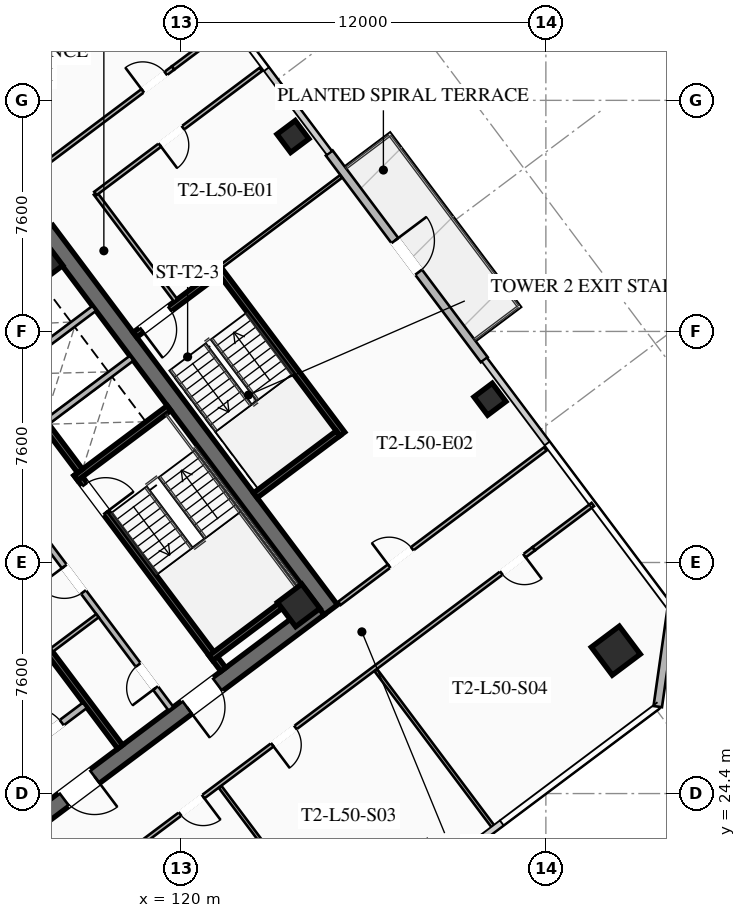
"""IFC4 building model, lengths in metres.
Left out: names, types, materials, properties, quantities, classifications, styles, units other than length and angle.
Written with IfcOpenShell. Run it as: python <this file> out.ifc"""

import sys

from ifc_helpers import new_model, si_unit, direction, frame, frame_2d, origin, origin_2d, place, context, subcontext, project, spatial, rectangle, hollow_rectangle, extrude, element, fill, save


model = new_model("IFC4")
c1 = context("Model", 3, precision=1e-05, world=origin(), true_north=direction((0.0, 1.0)))
c2 = subcontext(c1, "Body", "Model", "MODEL_VIEW")
j1 = project(units=[si_unit("LENGTHUNIT", "METRE"), si_unit("PLANEANGLEUNIT", "RADIAN")], contexts=[c1])
p1 = place(None, origin())
s1 = spatial("IfcSite", under=j1, at=p1, CompositionType="ELEMENT")
p2 = place(p1, origin())
s2 = spatial("IfcBuilding", under=s1, at=p2, CompositionType="ELEMENT")
p3 = place(p2, frame((0.0, 0.0, 185.4)))
s3 = spatial("IfcBuildingStorey", under=s2, at=p3, CompositionType="ELEMENT", Elevation=185.4)
p4 = place(p3, frame((115.564, 42.923, 0.0), z_axis=(0.0, 0.0, 1.0), x_axis=(0.600005007985, -0.799996243986, 0.0)))
e1 = element("IfcWall", 1, at=p4, inside=s3, PredefinedType="SHEAR", context=c2, shape_type="SweptSolid", body=[
    extrude(rectangle(XDim=15.6, YDim=0.55, at=frame_2d((7.8, 0.0))), origin(), (0.0, 0.0, 1.0), 3.55),
])
p5 = place(p3, frame((124.539, 30.498, 0.0), z_axis=(0.0, 0.0, 1.0), x_axis=(-0.799998054672, -0.600002593761, 0.0)))
e2 = element("IfcWall", 2, at=p5, inside=s3, PredefinedType="SHEAR", context=c2, shape_type="SweptSolid", body=[
    extrude(rectangle(XDim=15.06, YDim=0.55, at=frame_2d((7.53, 0.0))), origin(), (0.0, 0.0, 1.0), 3.55),
])
p6 = place(p5, frame((9.23, 0.0, 0.0)))
e3 = element("IfcOpeningElement", 3, at=p6, cuts=e2, PredefinedType="OPENING", context=c2, shape_type="SweptSolid", body=[
    extrude(rectangle(XDim=1.25, YDim=2.25, at=frame_2d((0.625, 1.125))), frame((0.0, 0.285, 0.0), z_axis=(0.0, -1.0, 0.0), x_axis=(1.0, 0.0, 0.0)), (0.0, 0.0, 1.0), 0.57),
])
p7 = place(p5, frame((4.18, 0.0, 0.0)))
e4 = element("IfcOpeningElement", 4, at=p7, cuts=e2, PredefinedType="OPENING", context=c2, shape_type="SweptSolid", body=[
    extrude(rectangle(XDim=1.25, YDim=2.25, at=frame_2d((0.625, 1.125))), frame((0.0, 0.285, 0.0), z_axis=(0.0, -1.0, 0.0), x_axis=(1.0, 0.0, 0.0)), (0.0, 0.0, 1.0), 0.57),
])
for number, where, z_axis, x_axis in (
    (5, (123.87, 30.59, 0.0), (0.0, 0.0, 1.0), (0.8, 0.6, 0.0)),
    (6, (115.41, 41.87, 0.0), (0.0, 0.0, 1.0), (0.8, 0.6, 0.0)),
):
    element("IfcColumn", number, at=place(p3, frame(where, z_axis=z_axis, x_axis=x_axis)), inside=s3, PredefinedType="COLUMN", context=c2, shape_type="SweptSolid", body=[
        extrude(hollow_rectangle(XDim=1.0, YDim=1.0, WallThickness=0.04, at=origin_2d()), origin(), (0.0, 0.0, 1.0), 3.37),
    ])
p8 = place(p3, frame((134.3, 29.1, 0.0), z_axis=(0.0, 0.0, 1.0), x_axis=(0.799999996291, 0.600000004945, 0.0)))
e7 = element("IfcColumn", 7, at=p8, inside=s3, PredefinedType="COLUMN", context=c2, shape_type="SweptSolid", body=[
    extrude(hollow_rectangle(XDim=1.15, YDim=1.15, WallThickness=0.045, at=origin_2d()), origin(), (0.0, 0.0, 1.0), 3.37),
])
for number, where, z_axis, x_axis in (
    (8, (130.16, 37.37, 0.0), (0.0, 0.0, 1.0), (0.8, 0.6, 0.0)),
    (9, (123.68, 46.01, 0.0), (0.0, 0.0, 1.0), (0.8, 0.6, 0.0)),
):
    element("IfcColumn", number, at=place(p3, frame(where, z_axis=z_axis, x_axis=x_axis)), inside=s3, PredefinedType="COLUMN", context=c2, shape_type="SweptSolid", body=[
        extrude(hollow_rectangle(XDim=0.75, YDim=0.75, WallThickness=0.032, at=origin_2d()), origin(), (0.0, 0.0, 1.0), 3.37),
    ])
p9 = place(p3, frame((124.874, 45.468, 0.0), z_axis=(0.0, 0.0, 1.0), x_axis=(0.600004595526, -0.799996553335, 0.0)))
e10 = element("IfcWall", 10, at=p9, inside=s3, PredefinedType="SOLIDWALL", context=c2, shape_type="SweptSolid", body=[
    extrude(rectangle(XDim=8.5, YDim=0.28, at=frame_2d((4.25, 0.0))), origin(), (0.0, 0.0, 1.0), 3.37),
])
p10 = place(p9, frame((3.6, 0.0, 0.0)))
e11 = element("IfcOpeningElement", 11, at=p10, cuts=e10, PredefinedType="OPENING", context=c2, shape_type="SweptSolid", body=[
    extrude(rectangle(XDim=1.3, YDim=2.15, at=frame_2d((0.65, 1.075))), frame((0.0, 0.15, 0.0), z_axis=(0.0, -1.0, 0.0), x_axis=(1.0, 0.0, 0.0)), (0.0, 0.0, 1.0), 0.3),
])
p11 = place(p3, frame((136.14, 30.48, 0.0), z_axis=(0.0, 0.0, 1.0), x_axis=(-0.141410847992, -0.989950994782, 0.0)))
e12 = element("IfcWall", 12, at=p11, inside=s3, PredefinedType="SOLIDWALL", context=c2, shape_type="SweptSolid", body=[
    extrude(rectangle(XDim=3.253, YDim=0.28, at=frame_2d((1.626, 0.0))), origin(), (0.0, 0.0, 1.0), 3.37),
])
p12 = place(p3, frame((116.56, 34.92, 0.0), z_axis=(0.0, 0.0, 1.0), x_axis=(0.59999029481, -0.8000072788, 0.0)))
e13 = element("IfcWall", 13, at=p12, inside=s3, PredefinedType="SHEAR", context=c2, shape_type="SweptSolid", body=[
    extrude(rectangle(XDim=8.05, YDim=0.2, at=frame_2d((4.025, 0.0))), origin(), (0.0, 0.0, 1.0), 3.37),
])
p13 = place(p12, frame((0.45, 0.0, 0.0)))
e14 = element("IfcOpeningElement", 14, at=p13, cuts=e13, PredefinedType="OPENING", context=c2, shape_type="SweptSolid", body=[
    extrude(rectangle(XDim=1.15, YDim=2.2, at=frame_2d((0.575, 1.1))), frame((0.0, 0.11, 0.0), z_axis=(0.0, -1.0, 0.0), x_axis=(1.0, 0.0, 0.0)), (0.0, 0.0, 1.0), 0.22),
])
for number, where, z_axis, x_axis in (
    (15, (116.54, 34.78, 0.0), (0.0, 0.0, 1.0), (0.8, 0.6, 0.0)),
    (16, (120.98, 28.86, 0.0), (0.0, 0.0, 1.0), (0.8, 0.6, 0.0)),
):
    element("IfcWall", number, at=place(p3, frame(where, z_axis=z_axis, x_axis=x_axis)), inside=s3, PredefinedType="SHEAR", context=c2, shape_type="SweptSolid", body=[
        extrude(rectangle(XDim=3.83, YDim=0.2, at=frame_2d((1.915, 0.0))), origin(), (0.0, 0.0, 1.0), 3.37),
    ])
p14 = place(p3, frame((117.998, 25.936, 0.0), z_axis=(0.0, 0.0, 1.0), x_axis=(-0.600002693989, 0.799997979501, 0.0)))
e17 = element("IfcWall", 17, at=p14, inside=s3, PredefinedType="SHEAR", context=c2, shape_type="SweptSolid", body=[
    extrude(rectangle(XDim=14.5, YDim=0.2, at=frame_2d((7.25, 0.0))), origin(), (0.0, 0.0, 1.0), 3.37),
])
p15 = place(p3, frame((114.316, 25.412, 0.0), z_axis=(0.0, 0.0, 1.0), x_axis=(0.800018601094, 0.59997519774, 0.0)))
e18 = element("IfcWall", 18, at=p15, inside=s3, PredefinedType="SOLIDWALL", context=c2, shape_type="SweptSolid", body=[
    extrude(rectangle(XDim=3.15, YDim=0.22, at=frame_2d((1.575, 0.0))), origin(), (0.0, 0.0, 1.0), 2.723),
])
p16 = place(p15, frame((0.95, 0.0, 0.0)))
e19 = element("IfcOpeningElement", 19, at=p16, cuts=e18, PredefinedType="OPENING", context=c2, shape_type="SweptSolid", body=[
    extrude(rectangle(XDim=1.25, YDim=2.25, at=frame_2d((0.625, 1.125))), frame((0.0, 0.12, 0.0), z_axis=(0.0, -1.0, 0.0), x_axis=(1.0, 0.0, 0.0)), (0.0, 0.0, 1.0), 0.24),
])
p17 = place(p3, frame((112.81, 40.17, 0.0), z_axis=(0.0, 0.0, 1.0), x_axis=(0.599993943644, -0.800004542231, 0.0)))
e20 = element("IfcWall", 20, at=p17, inside=s3, PredefinedType="SHEAR", context=c2, shape_type="SweptSolid", body=[
    extrude(rectangle(XDim=6.45, YDim=0.2, at=frame_2d((3.225, 0.0))), origin(), (0.0, 0.0, 1.0), 3.37),
])
for number, where, z_axis, x_axis in (
    (21, (115.59, 36.63, 0.0), (0.0, 0.0, 1.0), (0.8, 0.6, 0.0)),
    (22, (114.36, 38.27, 0.0), (0.0, 0.0, 1.0), (0.8, 0.6, 0.0)),
):
    element("IfcWall", number, at=place(p3, frame(where, z_axis=z_axis, x_axis=x_axis)), inside=s3, PredefinedType="SOLIDWALL", context=c2, shape_type="SweptSolid", body=[
        extrude(rectangle(XDim=3.48, YDim=0.2, at=frame_2d((1.74, 0.0))), origin(), (0.0, 0.0, 1.0), 3.37),
    ])
p18 = place(p3, frame((119.67, 27.19, 0.0), z_axis=(0.0, 0.0, 1.0), x_axis=(-0.599988677396, 0.800008491828, 0.0)))
e23 = element("IfcWall", 23, at=p18, inside=s3, PredefinedType="SOLIDWALL", context=c2, shape_type="SweptSolid", body=[
    extrude(rectangle(XDim=6.9, YDim=0.2, at=frame_2d((3.45, 0.0))), origin(), (0.0, 0.0, 1.0), 2.723),
])
p19 = place(p18, frame((0.85, 0.0, 0.0)))
e24 = element("IfcOpeningElement", 24, at=p19, cuts=e23, PredefinedType="OPENING", context=c2, shape_type="SweptSolid", body=[
    extrude(rectangle(XDim=0.95, YDim=2.05, at=frame_2d((0.475, 1.025))), frame((0.0, 0.11, 0.0), z_axis=(0.0, -1.0, 0.0), x_axis=(1.0, 0.0, 0.0)), (0.0, 0.0, 1.0), 0.22),
])
p20 = place(p18, frame((4.8, 0.0, 0.0)))
e25 = element("IfcOpeningElement", 25, at=p20, cuts=e23, PredefinedType="OPENING", context=c2, shape_type="SweptSolid", body=[
    extrude(rectangle(XDim=1.05, YDim=2.2, at=frame_2d((0.525, 1.1))), frame((0.0, 0.11, 0.0), z_axis=(0.0, -1.0, 0.0), x_axis=(1.0, 0.0, 0.0)), (0.0, 0.0, 1.0), 0.22),
])
p21 = place(p3, frame((115.746, 29.122, 0.0), z_axis=(0.0, 0.0, 1.0), x_axis=(0.8, 0.6, 0.0)))
e26 = element("IfcWall", 26, at=p21, inside=s3, PredefinedType="PARTITIONING", context=c2, shape_type="SweptSolid", body=[
    extrude(rectangle(XDim=1.88, YDim=0.135, at=frame_2d((0.94, 0.0))), origin(), (0.0, 0.0, 1.0), 2.723),
])
p22 = place(p3, frame((125.304, 36.228, 0.0), z_axis=(0.0, 0.0, 1.0), x_axis=(-0.59998851072, 0.800008616831, 0.0)))
e27 = element("IfcWall", 27, at=p22, inside=s3, PredefinedType="SHEAR", context=c2, shape_type="SweptSolid", body=[
    extrude(rectangle(XDim=6.8, YDim=0.2, at=frame_2d((3.4, 0.0))), origin(), (0.0, 0.0, 1.0), 3.37),
])
p23 = place(p3, frame((121.204, 41.528, 0.0), z_axis=(0.0, 0.0, 1.0), x_axis=(-0.800017232136, -0.599977023131, 0.0)))
e28 = element("IfcWall", 28, at=p23, inside=s3, PredefinedType="SHEAR", context=c2, shape_type="SweptSolid", body=[
    extrude(rectangle(XDim=3.4, YDim=0.2, at=frame_2d((1.7, 0.0))), origin(), (0.0, 0.0, 1.0), 3.37),
])
p24 = place(p23, frame((1.975, 0.0, 0.0)))
e29 = element("IfcOpeningElement", 29, at=p24, cuts=e28, PredefinedType="OPENING", context=c2, shape_type="SweptSolid", body=[
    extrude(rectangle(XDim=1.15, YDim=2.2, at=frame_2d((0.575, 1.1))), frame((0.0, 0.11, 0.0), z_axis=(0.0, -1.0, 0.0), x_axis=(1.0, 0.0, 0.0)), (0.0, 0.0, 1.0), 0.22),
])
p25 = place(p3, frame((122.444, 34.208, 0.0), z_axis=(0.0, 0.0, 1.0), x_axis=(0.79999138319, 0.600011488909, 0.0)))
e30 = element("IfcWall", 30, at=p25, inside=s3, PredefinedType="SHEAR", context=c2, shape_type="SweptSolid", body=[
    extrude(rectangle(XDim=3.4, YDim=0.2, at=frame_2d((1.7, 0.0))), origin(), (0.0, 0.0, 1.0), 3.37),
])
p26 = place(p3, frame((119.824, 40.618, 0.0), z_axis=(0.0, 0.0, 1.0), x_axis=(-0.599982243973, 0.800013316712, 0.0)))
e31 = element("IfcWall", 31, at=p26, inside=s3, PredefinedType="PARTITIONING", context=c2, shape_type="SweptSolid", body=[
    extrude(rectangle(XDim=4.4, YDim=0.135, at=frame_2d((2.2, 0.0))), origin(), (0.0, 0.0, 1.0), 2.723),
])
p27 = place(p3, frame((96.778, 31.046, 0.0), z_axis=(0.0, 0.0, 1.0), x_axis=(0.799995916807, 0.600005444218, 0.0)))
e32 = element("IfcWall", 32, at=p27, inside=s3, PredefinedType="PARTITIONING", context=c2, shape_type="SweptSolid", body=[
    extrude(rectangle(XDim=28.7, YDim=0.135, at=frame_2d((14.35, 0.0))), origin(), (0.0, 0.0, 1.0), 2.723),
])
p28 = place(p27, frame((0.3, 0.0, 0.0)))
e33 = element("IfcOpeningElement", 33, at=p28, cuts=e32, PredefinedType="OPENING", context=c2, shape_type="SweptSolid", body=[
    extrude(rectangle(XDim=0.95, YDim=2.05, at=frame_2d((0.475, 1.025))), frame((0.0, 0.077, 0.0), z_axis=(0.0, -1.0, 0.0), x_axis=(1.0, 0.0, 0.0)), (0.0, 0.0, 1.0), 0.155),
])
p29 = place(p27, frame((13.82, 0.0, 0.0)))
e34 = element("IfcOpeningElement", 34, at=p29, cuts=e32, PredefinedType="OPENING", context=c2, shape_type="SweptSolid", body=[
    extrude(rectangle(XDim=0.95, YDim=2.05, at=frame_2d((0.475, 1.025))), frame((0.0, 0.077, 0.0), z_axis=(0.0, -1.0, 0.0), x_axis=(1.0, 0.0, 0.0)), (0.0, 0.0, 1.0), 0.155),
])
p30 = place(p27, frame((17.821, 0.0, 0.0)))
e35 = element("IfcOpeningElement", 35, at=p30, cuts=e32, PredefinedType="OPENING", context=c2, shape_type="SweptSolid", body=[
    extrude(rectangle(XDim=0.95, YDim=2.05, at=frame_2d((0.475, 1.025))), frame((0.0, 0.077, 0.0), z_axis=(0.0, -1.0, 0.0), x_axis=(1.0, 0.0, 0.0)), (0.0, 0.0, 1.0), 0.155),
])
p31 = place(p27, frame((27.45, 0.0, 0.0)))
e36 = element("IfcOpeningElement", 36, at=p31, cuts=e32, PredefinedType="OPENING", context=c2, shape_type="SweptSolid", body=[
    extrude(rectangle(XDim=0.95, YDim=2.05, at=frame_2d((0.475, 1.025))), frame((0.0, 0.077, 0.0), z_axis=(0.0, -1.0, 0.0), x_axis=(1.0, 0.0, 0.0)), (0.0, 0.0, 1.0), 0.155),
])
p32 = place(p3, frame((119.738, 48.266, 0.0), z_axis=(0.0, 0.0, 1.0), x_axis=(0.799975885537, 0.600032151272, 0.0)))
e37 = element("IfcWall", 37, at=p32, inside=s3, PredefinedType="PARTITIONING", context=c2, shape_type="SweptSolid", body=[
    extrude(rectangle(XDim=2.43, YDim=0.135, at=frame_2d((1.215, 0.0))), origin(), (0.0, 0.0, 1.0), 2.723),
])
p33 = place(p3, frame((131.6, 32.45, 0.0), z_axis=(0.0, 0.0, 1.0), x_axis=(-0.800003062365, -0.599995916825, 0.0)))
e38 = element("IfcWall", 38, at=p33, inside=s3, PredefinedType="PARTITIONING", context=c2, shape_type="SweptSolid", body=[
    extrude(rectangle(XDim=28.7, YDim=0.135, at=frame_2d((14.35, 0.0))), origin(), (0.0, 0.0, 1.0), 2.723),
])
p34 = place(p33, frame((27.37, 0.0, 0.0)))
e39 = element("IfcOpeningElement", 39, at=p34, cuts=e38, PredefinedType="OPENING", context=c2, shape_type="SweptSolid", body=[
    extrude(rectangle(XDim=0.95, YDim=2.05, at=frame_2d((0.475, 1.025))), frame((0.0, 0.077, 0.0), z_axis=(0.0, -1.0, 0.0), x_axis=(1.0, 0.0, 0.0)), (0.0, 0.0, 1.0), 0.155),
])
p35 = place(p33, frame((13.59, 0.0, 0.0)))
e40 = element("IfcOpeningElement", 40, at=p35, cuts=e38, PredefinedType="OPENING", context=c2, shape_type="SweptSolid", body=[
    extrude(rectangle(XDim=0.95, YDim=2.05, at=frame_2d((0.475, 1.025))), frame((0.0, 0.077, 0.0), z_axis=(0.0, -1.0, 0.0), x_axis=(1.0, 0.0, 0.0)), (0.0, 0.0, 1.0), 0.155),
])
p36 = place(p33, frame((9.796, 0.0, 0.0)))
e41 = element("IfcOpeningElement", 41, at=p36, cuts=e38, PredefinedType="OPENING", context=c2, shape_type="SweptSolid", body=[
    extrude(rectangle(XDim=0.95, YDim=2.05, at=frame_2d((0.475, 1.025))), frame((0.0, 0.077, 0.0), z_axis=(0.0, -1.0, 0.0), x_axis=(1.0, 0.0, 0.0)), (0.0, 0.0, 1.0), 0.155),
])
p37 = place(p33, frame((0.38, 0.0, 0.0)))
e42 = element("IfcOpeningElement", 42, at=p37, cuts=e38, PredefinedType="OPENING", context=c2, shape_type="SweptSolid", body=[
    extrude(rectangle(XDim=0.95, YDim=2.05, at=frame_2d((0.475, 1.025))), frame((0.0, 0.077, 0.0), z_axis=(0.0, -1.0, 0.0), x_axis=(1.0, 0.0, 0.0)), (0.0, 0.0, 1.0), 0.155),
])
p38 = place(p3, frame((131.6, 32.45, 0.0), z_axis=(0.0, 0.0, 1.0), x_axis=(0.799975885537, 0.600032151272, 0.0)))
e43 = element("IfcWall", 43, at=p38, inside=s3, PredefinedType="PARTITIONING", context=c2, shape_type="SweptSolid", body=[
    extrude(rectangle(XDim=2.43, YDim=0.135, at=frame_2d((1.215, 0.0))), origin(), (0.0, 0.0, 1.0), 2.723),
])
for number, where, z_axis, x_axis in (
    (44, (125.188, 19.416, 0.0), (0.0, 0.0, 1.0), (-0.6, 0.8, 0.0)),
    (45, (130.308, 23.256, 0.0), (0.0, 0.0, 1.0), (-0.6, 0.8, 0.0)),
):
    element("IfcWall", number, at=place(p3, frame(where, z_axis=z_axis, x_axis=x_axis)), inside=s3, PredefinedType="PARTITIONING", context=c2, shape_type="SweptSolid", body=[
        extrude(rectangle(XDim=6.5, YDim=0.11, at=frame_2d((3.25, 0.0))), origin(), (0.0, 0.0, 1.0), 2.723),
    ])
p39 = place(p3, frame((122.624, 48.218, 0.0), z_axis=(0.0, 0.0, 1.0), x_axis=(-0.79999138319, -0.600011488909, 0.0)))
e46 = element("IfcWall", 46, at=p39, inside=s3, PredefinedType="PARTITIONING", context=c2, shape_type="SweptSolid", body=[
    extrude(rectangle(XDim=6.8, YDim=0.135, at=frame_2d((3.4, 0.0))), origin(), (0.0, 0.0, 1.0), 2.723),
])
p40 = place(p39, frame((3.2, 0.0, 0.0)))
e47 = element("IfcOpeningElement", 47, at=p40, cuts=e46, PredefinedType="OPENING", context=c2, shape_type="SweptSolid", body=[
    extrude(rectangle(XDim=0.95, YDim=2.05, at=frame_2d((0.475, 1.025))), frame((0.0, 0.077, 0.0), z_axis=(0.0, -1.0, 0.0), x_axis=(1.0, 0.0, 0.0)), (0.0, 0.0, 1.0), 0.155),
])
p41 = place(p3, frame((125.208, 30.656, 0.0), z_axis=(0.0, 0.0, 1.0), x_axis=(0.799993082085, 0.600009223776, 0.0)))
e48 = element("IfcWall", 48, at=p41, inside=s3, PredefinedType="PARTITIONING", context=c2, shape_type="SweptSolid", body=[
    extrude(rectangle(XDim=8.47, YDim=0.135, at=frame_2d((4.235, 0.0))), origin(), (0.0, 0.0, 1.0), 2.723),
])
p42 = place(p41, frame((2.045, 0.0, 0.0)))
e49 = element("IfcOpeningElement", 49, at=p42, cuts=e48, PredefinedType="OPENING", context=c2, shape_type="SweptSolid", body=[
    extrude(rectangle(XDim=0.95, YDim=2.05, at=frame_2d((0.475, 1.025))), frame((0.0, 0.077, 0.0), z_axis=(0.0, -1.0, 0.0), x_axis=(1.0, 0.0, 0.0)), (0.0, 0.0, 1.0), 0.155),
])
p43 = place(p3, frame((125.264, 44.698, 0.0), z_axis=(0.0, 0.0, 1.0), x_axis=(-0.8, -0.6, 0.0)))
e50 = element("IfcWall", 50, at=p43, inside=s3, PredefinedType="PARTITIONING", context=c2, shape_type="SweptSolid", body=[
    extrude(rectangle(XDim=4.95, YDim=0.11, at=frame_2d((2.475, 0.0))), origin(), (0.0, 0.0, 1.0), 2.723),
])
p44 = place(p10, origin())
e51 = element("IfcDoor", 51, at=p44, inside=s3, OperationType="SINGLE_SWING_LEFT", PredefinedType="DOOR", context=c2, shape_type="SweptSolid", body=[
    extrude(rectangle(XDim=1.3, YDim=2.15, at=frame_2d((0.65, 1.075))), frame((0.0, 0.025, 0.0), z_axis=(0.0, -1.0, 0.0), x_axis=(1.0, 0.0, 0.0)), (0.0, 0.0, 1.0), 0.05),
])
fill(e11, e51)
p45 = place(p6, origin())
e52 = element("IfcDoor", 52, at=p45, inside=s3, OperationType="SINGLE_SWING_LEFT", PredefinedType="DOOR", context=c2, shape_type="SweptSolid", body=[
    extrude(rectangle(XDim=1.25, YDim=2.25, at=frame_2d((0.625, 1.125))), frame((0.0, 0.025, 0.0), z_axis=(0.0, -1.0, 0.0), x_axis=(1.0, 0.0, 0.0)), (0.0, 0.0, 1.0), 0.05),
])
fill(e3, e52)
p46 = place(p7, origin())
e53 = element("IfcDoor", 53, at=p46, inside=s3, OperationType="SINGLE_SWING_RIGHT", PredefinedType="DOOR", context=c2, shape_type="SweptSolid", body=[
    extrude(rectangle(XDim=1.25, YDim=2.25, at=frame_2d((0.625, 1.125))), frame((0.0, 0.025, 0.0), z_axis=(0.0, -1.0, 0.0), x_axis=(1.0, 0.0, 0.0)), (0.0, 0.0, 1.0), 0.05),
])
fill(e4, e53)
p47 = place(p13, origin())
e54 = element("IfcDoor", 54, at=p47, inside=s3, OperationType="SINGLE_SWING_RIGHT", PredefinedType="DOOR", context=c2, shape_type="SweptSolid", body=[
    extrude(rectangle(XDim=1.15, YDim=2.2, at=frame_2d((0.575, 1.1))), frame((0.0, 0.025, 0.0), z_axis=(0.0, -1.0, 0.0), x_axis=(1.0, 0.0, 0.0)), (0.0, 0.0, 1.0), 0.05),
])
fill(e14, e54)
p48 = place(p16, origin())
e55 = element("IfcDoor", 55, at=p48, inside=s3, OperationType="SINGLE_SWING_LEFT", PredefinedType="DOOR", context=c2, shape_type="SweptSolid", body=[
    extrude(rectangle(XDim=1.25, YDim=2.25, at=frame_2d((0.625, 1.125))), frame((0.0, 0.025, 0.0), z_axis=(0.0, -1.0, 0.0), x_axis=(1.0, 0.0, 0.0)), (0.0, 0.0, 1.0), 0.05),
])
fill(e19, e55)
p49 = place(p19, origin())
e56 = element("IfcDoor", 56, at=p49, inside=s3, OperationType="SINGLE_SWING_LEFT", PredefinedType="DOOR", context=c2, shape_type="SweptSolid", body=[
    extrude(rectangle(XDim=0.95, YDim=2.05, at=frame_2d((0.475, 1.025))), frame((0.0, 0.025, 0.0), z_axis=(0.0, -1.0, 0.0), x_axis=(1.0, 0.0, 0.0)), (0.0, 0.0, 1.0), 0.05),
])
fill(e24, e56)
p50 = place(p20, origin())
e57 = element("IfcDoor", 57, at=p50, inside=s3, OperationType="SINGLE_SWING_RIGHT", PredefinedType="DOOR", context=c2, shape_type="SweptSolid", body=[
    extrude(rectangle(XDim=1.05, YDim=2.2, at=frame_2d((0.525, 1.1))), frame((0.0, 0.025, 0.0), z_axis=(0.0, -1.0, 0.0), x_axis=(1.0, 0.0, 0.0)), (0.0, 0.0, 1.0), 0.05),
])
fill(e25, e57)
p51 = place(p24, origin())
e58 = element("IfcDoor", 58, at=p51, inside=s3, OperationType="SINGLE_SWING_RIGHT", PredefinedType="DOOR", context=c2, shape_type="SweptSolid", body=[
    extrude(rectangle(XDim=1.15, YDim=2.2, at=frame_2d((0.575, 1.1))), frame((0.0, 0.025, 0.0), z_axis=(0.0, -1.0, 0.0), x_axis=(1.0, 0.0, 0.0)), (0.0, 0.0, 1.0), 0.05),
])
fill(e29, e58)
p52 = place(p31, origin())
e59 = element("IfcDoor", 59, at=p52, inside=s3, OperationType="SINGLE_SWING_LEFT", PredefinedType="DOOR", context=c2, shape_type="SweptSolid", body=[
    extrude(rectangle(XDim=0.95, YDim=2.05, at=frame_2d((0.475, 1.025))), frame((0.0, 0.025, 0.0), z_axis=(0.0, -1.0, 0.0), x_axis=(1.0, 0.0, 0.0)), (0.0, 0.0, 1.0), 0.05),
])
fill(e36, e59)
p53 = place(p35, origin())
e60 = element("IfcDoor", 60, at=p53, inside=s3, OperationType="SINGLE_SWING_LEFT", PredefinedType="DOOR", context=c2, shape_type="SweptSolid", body=[
    extrude(rectangle(XDim=0.95, YDim=2.05, at=frame_2d((0.475, 1.025))), frame((0.0, 0.025, 0.0), z_axis=(0.0, -1.0, 0.0), x_axis=(1.0, 0.0, 0.0)), (0.0, 0.0, 1.0), 0.05),
])
fill(e40, e60)
p54 = place(p36, origin())
e61 = element("IfcDoor", 61, at=p54, inside=s3, OperationType="SINGLE_SWING_RIGHT", PredefinedType="DOOR", context=c2, shape_type="SweptSolid", body=[
    extrude(rectangle(XDim=0.95, YDim=2.05, at=frame_2d((0.475, 1.025))), frame((0.0, 0.025, 0.0), z_axis=(0.0, -1.0, 0.0), x_axis=(1.0, 0.0, 0.0)), (0.0, 0.0, 1.0), 0.05),
])
fill(e41, e61)
p55 = place(p37, origin())
e62 = element("IfcDoor", 62, at=p55, inside=s3, OperationType="SINGLE_SWING_LEFT", PredefinedType="DOOR", context=c2, shape_type="SweptSolid", body=[
    extrude(rectangle(XDim=0.95, YDim=2.05, at=frame_2d((0.475, 1.025))), frame((0.0, 0.025, 0.0), z_axis=(0.0, -1.0, 0.0), x_axis=(1.0, 0.0, 0.0)), (0.0, 0.0, 1.0), 0.05),
])
fill(e42, e62)
p56 = place(p40, origin())
e63 = element("IfcDoor", 63, at=p56, inside=s3, OperationType="SINGLE_SWING_RIGHT", PredefinedType="DOOR", context=c2, shape_type="SweptSolid", body=[
    extrude(rectangle(XDim=0.95, YDim=2.05, at=frame_2d((0.475, 1.025))), frame((0.0, 0.025, 0.0), z_axis=(0.0, -1.0, 0.0), x_axis=(1.0, 0.0, 0.0)), (0.0, 0.0, 1.0), 0.05),
])
fill(e47, e63)
p57 = place(p42, origin())
e64 = element("IfcDoor", 64, at=p57, inside=s3, OperationType="SINGLE_SWING_LEFT", PredefinedType="DOOR", context=c2, shape_type="SweptSolid", body=[
    extrude(rectangle(XDim=0.95, YDim=2.05, at=frame_2d((0.475, 1.025))), frame((0.0, 0.025, 0.0), z_axis=(0.0, -1.0, 0.0), x_axis=(1.0, 0.0, 0.0)), (0.0, 0.0, 1.0), 0.05),
])
fill(e49, e64)
save(model, sys.argv[1])
